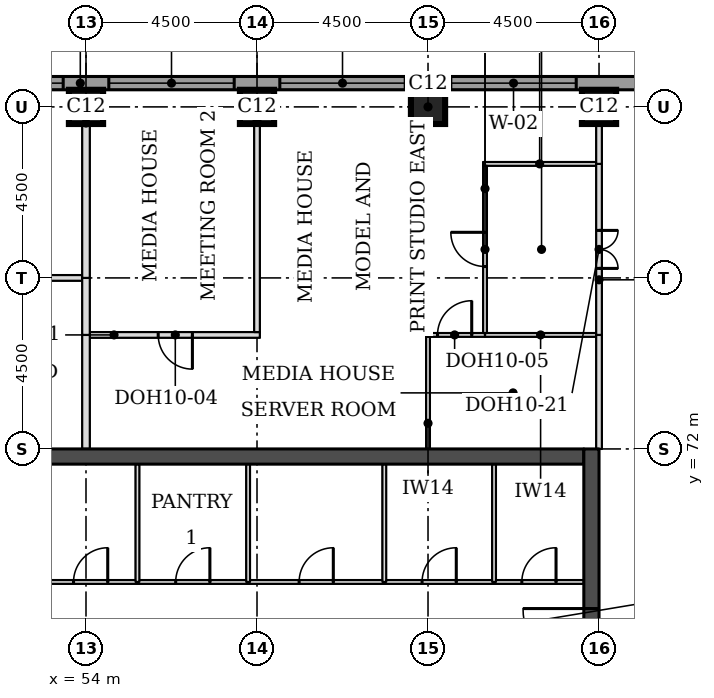
"""IFC4 building model, lengths in metres.
Left out: names, types, materials, properties, quantities, classifications, styles, units other than length and angle.
Written with IfcOpenShell. Run it as: python <this file> out.ifc"""

import sys

from ifc_helpers import new_model, si_unit, direction, frame, frame_2d, origin, origin_2d, place, context, subcontext, project, spatial, rectangle, extrude, element, fill, save


model = new_model("IFC4")
c1 = context("Model", 3, precision=1e-05, world=origin(), true_north=direction((0.0, 1.0)))
c2 = subcontext(c1, "Body", "Model", "MODEL_VIEW")
j1 = project(units=[si_unit("LENGTHUNIT", "METRE"), si_unit("PLANEANGLEUNIT", "RADIAN")], contexts=[c1])
p1 = place(None, origin())
s1 = spatial("IfcSite", under=j1, at=p1, CompositionType="ELEMENT")
p2 = place(p1, origin())
s2 = spatial("IfcBuilding", under=s1, at=p2, CompositionType="ELEMENT")
p3 = place(p2, frame((0.0, 0.0, 226.7)))
s3 = spatial("IfcBuildingStorey", under=s2, at=p3, CompositionType="ELEMENT", Elevation=226.7)
for number, where, z_axis, x_axis in (
    (1, (54.0, 81.0, 0.0), (0.0, 0.0, 1.0), (1.0, 0.0, 0.0)),
    (2, (58.5, 81.0, 0.0), (0.0, 0.0, 1.0), (1.0, 0.0, 0.0)),
    (3, (63.0, 81.0, 0.0), (0.0, 0.0, 1.0), (1.0, 0.0, 0.0)),
    (4, (67.5, 81.0, 0.0), (0.0, 0.0, 1.0), (1.0, 0.0, 0.0)),
):
    element("IfcColumn", number, at=place(p3, frame(where, z_axis=z_axis, x_axis=x_axis)), inside=s3, PredefinedType="COLUMN", context=c2, shape_type="SweptSolid", body=[
        extrude(rectangle(XDim=0.9, YDim=0.9, at=origin_2d()), origin(), (0.0, 0.0, 1.0), 3.7),
    ])
p4 = place(p3, frame((45.4, 71.8, 0.0), z_axis=(0.0, 0.0, 1.0), x_axis=(1.0, 0.0, 0.0)))
e5 = element("IfcWall", 5, at=p4, inside=s3, PredefinedType="SHEAR", context=c2, shape_type="SweptSolid", body=[
    extrude(rectangle(XDim=21.7, YDim=0.4, at=frame_2d((10.85, 0.0))), origin(), (0.0, 0.0, 1.0), 3.7),
])
p5 = place(p3, frame((67.3, 49.5, 0.0), z_axis=(0.0, 0.0, 1.0), x_axis=(0.0, 1.0, 0.0)))
e6 = element("IfcWall", 6, at=p5, inside=s3, PredefinedType="SHEAR", context=c2, shape_type="SweptSolid", body=[
    extrude(rectangle(XDim=22.5, YDim=0.4, at=frame_2d((11.25, 0.0))), origin(), (0.0, 0.0, 1.0), 3.7),
])
p6 = place(p5, frame((4.2, 0.0, 0.0)))
e7 = element("IfcOpeningElement", 7, at=p6, cuts=e6, PredefinedType="OPENING", context=c2, shape_type="SweptSolid", body=[
    extrude(rectangle(XDim=1.8, YDim=2.1, at=frame_2d((0.9, 1.05))), frame((0.0, 0.21, 0.0), z_axis=(0.0, -1.0, 0.0), x_axis=(1.0, 0.0, 0.0)), (0.0, 0.0, 1.0), 0.42),
])
p7 = place(p5, frame((6.9, 0.0, 0.0)))
e8 = element("IfcOpeningElement", 8, at=p7, cuts=e6, PredefinedType="OPENING", context=c2, shape_type="SweptSolid", body=[
    extrude(rectangle(XDim=1.1, YDim=2.1, at=frame_2d((0.55, 1.05))), frame((0.0, 0.21, 0.0), z_axis=(0.0, -1.0, 0.0), x_axis=(1.0, 0.0, 0.0)), (0.0, 0.0, 1.0), 0.42),
])
p8 = place(p5, frame((13.6, 0.0, 0.0)))
e9 = element("IfcOpeningElement", 9, at=p8, cuts=e6, PredefinedType="OPENING", context=c2, shape_type="SweptSolid", body=[
    extrude(rectangle(XDim=1.1, YDim=2.1, at=frame_2d((0.55, 1.05))), frame((0.0, 0.21, 0.0), z_axis=(0.0, -1.0, 0.0), x_axis=(1.0, 0.0, 0.0)), (0.0, 0.0, 1.0), 0.42),
])
p9 = place(p5, frame((16.5, 0.0, 0.0)))
e10 = element("IfcOpeningElement", 10, at=p9, cuts=e6, PredefinedType="OPENING", context=c2, shape_type="SweptSolid", body=[
    extrude(rectangle(XDim=1.8, YDim=2.1, at=frame_2d((0.9, 1.05))), frame((0.0, 0.21, 0.0), z_axis=(0.0, -1.0, 0.0), x_axis=(1.0, 0.0, 0.0)), (0.0, 0.0, 1.0), 0.42),
])
p10 = place(p3, frame((72.331, 81.625, 0.0), z_axis=(0.0, 0.0, 1.0), x_axis=(-1.0, 0.0, 0.0)))
e11 = element("IfcWall", 11, at=p10, inside=s3, PredefinedType="STANDARD", context=c2, shape_type="SweptSolid", body=[
    extrude(rectangle(XDim=32.163, YDim=0.35, at=frame_2d((16.081, 0.0))), origin(), (0.0, 0.0, 1.0), 3.525),
])
p11 = place(p10, frame((5.431, 0.0, 0.9)))
e12 = element("IfcOpeningElement", 12, at=p11, cuts=e11, PredefinedType="OPENING", context=c2, shape_type="SweptSolid", body=[
    extrude(rectangle(XDim=3.3, YDim=1.9, at=frame_2d((1.65, 0.95))), frame((0.0, 0.185, 0.0), z_axis=(0.0, -1.0, 0.0), x_axis=(1.0, 0.0, 0.0)), (0.0, 0.0, 1.0), 0.37),
])
p12 = place(p10, frame((9.931, 0.0, 0.9)))
e13 = element("IfcOpeningElement", 13, at=p12, cuts=e11, PredefinedType="OPENING", context=c2, shape_type="SweptSolid", body=[
    extrude(rectangle(XDim=3.3, YDim=1.9, at=frame_2d((1.65, 0.95))), frame((0.0, 0.185, 0.0), z_axis=(0.0, -1.0, 0.0), x_axis=(1.0, 0.0, 0.0)), (0.0, 0.0, 1.0), 0.37),
])
p13 = place(p10, frame((14.431, 0.0, 0.9)))
e14 = element("IfcOpeningElement", 14, at=p13, cuts=e11, PredefinedType="OPENING", context=c2, shape_type="SweptSolid", body=[
    extrude(rectangle(XDim=3.3, YDim=1.9, at=frame_2d((1.65, 0.95))), frame((0.0, 0.185, 0.0), z_axis=(0.0, -1.0, 0.0), x_axis=(1.0, 0.0, 0.0)), (0.0, 0.0, 1.0), 0.37),
])
p14 = place(p10, frame((18.931, 0.0, 0.9)))
e15 = element("IfcOpeningElement", 15, at=p14, cuts=e11, PredefinedType="OPENING", context=c2, shape_type="SweptSolid", body=[
    extrude(rectangle(XDim=3.3, YDim=1.9, at=frame_2d((1.65, 0.95))), frame((0.0, 0.185, 0.0), z_axis=(0.0, -1.0, 0.0), x_axis=(1.0, 0.0, 0.0)), (0.0, 0.0, 1.0), 0.37),
])
p15 = place(p10, frame((23.431, 0.0, 0.9)))
e16 = element("IfcOpeningElement", 16, at=p15, cuts=e11, PredefinedType="OPENING", context=c2, shape_type="SweptSolid", body=[
    extrude(rectangle(XDim=3.3, YDim=1.9, at=frame_2d((1.65, 0.95))), frame((0.0, 0.185, 0.0), z_axis=(0.0, -1.0, 0.0), x_axis=(1.0, 0.0, 0.0)), (0.0, 0.0, 1.0), 0.37),
])
p16 = place(p3, frame((54.1, 75.0, 0.0), z_axis=(0.0, 0.0, 1.0), x_axis=(1.0, 0.0, 0.0)))
e17 = element("IfcWall", 17, at=p16, inside=s3, PredefinedType="PARTITIONING", context=c2, shape_type="SweptSolid", body=[
    extrude(rectangle(XDim=4.475, YDim=0.15, at=frame_2d((2.237, 0.0))), origin(), (0.0, 0.0, 1.0), 3.55),
])
p17 = place(p16, frame((1.8, 0.0, 0.0)))
e18 = element("IfcOpeningElement", 18, at=p17, cuts=e17, PredefinedType="OPENING", context=c2, shape_type="SweptSolid", body=[
    extrude(rectangle(XDim=0.9, YDim=2.1, at=frame_2d((0.45, 1.05))), frame((0.0, 0.085, 0.0), z_axis=(0.0, -1.0, 0.0), x_axis=(1.0, 0.0, 0.0)), (0.0, 0.0, 1.0), 0.17),
])
p18 = place(p3, frame((62.95, 75.0, 0.0), z_axis=(0.0, 0.0, 1.0), x_axis=(1.0, 0.0, 0.0)))
e19 = element("IfcWall", 19, at=p18, inside=s3, PredefinedType="PARTITIONING", context=c2, shape_type="SweptSolid", body=[
    extrude(rectangle(XDim=1.55, YDim=0.1, at=frame_2d((0.775, 0.0))), origin(), (0.0, 0.0, 1.0), 3.55),
])
p19 = place(p18, frame((0.3, 0.0, 0.0)))
e20 = element("IfcOpeningElement", 20, at=p19, cuts=e19, PredefinedType="OPENING", context=c2, shape_type="SweptSolid", body=[
    extrude(rectangle(XDim=0.9, YDim=2.1, at=frame_2d((0.45, 1.05))), frame((0.0, 0.06, 0.0), z_axis=(0.0, -1.0, 0.0), x_axis=(1.0, 0.0, 0.0)), (0.0, 0.0, 1.0), 0.12),
])
p20 = place(p3, frame((64.5, 75.0, 0.0), z_axis=(0.0, 0.0, 1.0), x_axis=(1.0, 0.0, 0.0)))
e21 = element("IfcWall", 21, at=p20, inside=s3, PredefinedType="PARTITIONING", context=c2, shape_type="SweptSolid", body=[
    extrude(rectangle(XDim=2.925, YDim=0.1, at=frame_2d((1.462, 0.0))), origin(), (0.0, 0.0, 1.0), 3.55),
])
p21 = place(p3, frame((49.425, 76.5, 0.0), z_axis=(0.0, 0.0, 1.0), x_axis=(1.0, 0.0, 0.0)))
e22 = element("IfcWall", 22, at=p21, inside=s3, PredefinedType="PARTITIONING", context=c2, shape_type="SweptSolid", body=[
    extrude(rectangle(XDim=4.475, YDim=0.15, at=frame_2d((2.237, 0.0))), origin(), (0.0, 0.0, 1.0), 3.55),
])
p22 = place(p21, frame((1.8, 0.0, 0.0)))
e23 = element("IfcOpeningElement", 23, at=p22, cuts=e22, PredefinedType="OPENING", context=c2, shape_type="SweptSolid", body=[
    extrude(rectangle(XDim=0.9, YDim=2.1, at=frame_2d((0.45, 1.05))), frame((0.0, 0.085, 0.0), z_axis=(0.0, -1.0, 0.0), x_axis=(1.0, 0.0, 0.0)), (0.0, 0.0, 1.0), 0.17),
])
p23 = place(p3, frame((64.45, 79.5, 0.0), z_axis=(0.0, 0.0, 1.0), x_axis=(1.0, 0.0, 0.0)))
e24 = element("IfcWall", 24, at=p23, inside=s3, PredefinedType="PARTITIONING", context=c2, shape_type="SweptSolid", body=[
    extrude(rectangle(XDim=2.975, YDim=0.1, at=frame_2d((1.488, 0.0))), origin(), (0.0, 0.0, 1.0), 3.55),
])
p24 = place(p3, frame((54.0, 72.0, 0.0), z_axis=(0.0, 0.0, 1.0), x_axis=(0.0, 1.0, 0.0)))
e25 = element("IfcWall", 25, at=p24, inside=s3, PredefinedType="PARTITIONING", context=c2, shape_type="SweptSolid", body=[
    extrude(rectangle(XDim=3.0, YDim=0.2, at=frame_2d((1.5, 0.0))), origin(), (0.0, 0.0, 1.0), 3.55),
])
p25 = place(p3, frame((63.0, 72.0, 0.0), z_axis=(0.0, 0.0, 1.0), x_axis=(0.0, 1.0, 0.0)))
e26 = element("IfcWall", 26, at=p25, inside=s3, PredefinedType="PARTITIONING", context=c2, shape_type="SweptSolid", body=[
    extrude(rectangle(XDim=2.95, YDim=0.1, at=frame_2d((1.475, 0.0))), origin(), (0.0, 0.0, 1.0), 3.55),
])
p26 = place(p3, frame((67.5, 72.0, 0.0), z_axis=(0.0, 0.0, 1.0), x_axis=(0.0, 1.0, 0.0)))
e27 = element("IfcWall", 27, at=p26, inside=s3, PredefinedType="PARTITIONING", context=c2, shape_type="SweptSolid", body=[
    extrude(rectangle(XDim=3.0, YDim=0.15, at=frame_2d((1.5, 0.0))), origin(), (0.0, 0.0, 1.0), 3.022),
])
p27 = place(p3, frame((54.0, 75.0, 0.0), z_axis=(0.0, 0.0, 1.0), x_axis=(0.0, 1.0, 0.0)))
e28 = element("IfcWall", 28, at=p27, inside=s3, PredefinedType="PARTITIONING", context=c2, shape_type="SweptSolid", body=[
    extrude(rectangle(XDim=1.5, YDim=0.2, at=frame_2d((0.75, 0.0))), origin(), (0.0, 0.0, 1.0), 3.55),
])
p28 = place(p3, frame((67.5, 75.0, 0.0), z_axis=(0.0, 0.0, 1.0), x_axis=(0.0, 1.0, 0.0)))
e29 = element("IfcWall", 29, at=p28, inside=s3, PredefinedType="PARTITIONING", context=c2, shape_type="SweptSolid", body=[
    extrude(rectangle(XDim=4.5, YDim=0.15, at=frame_2d((2.25, 0.0))), origin(), (0.0, 0.0, 1.0), 3.022),
])
p29 = place(p28, frame((1.75, 0.0, 0.0)))
e30 = element("IfcOpeningElement", 30, at=p29, cuts=e29, PredefinedType="OPENING", context=c2, shape_type="SweptSolid", body=[
    extrude(rectangle(XDim=1.0, YDim=2.1, at=frame_2d((0.5, 1.05))), frame((0.0, 0.085, 0.0), z_axis=(0.0, -1.0, 0.0), x_axis=(1.0, 0.0, 0.0)), (0.0, 0.0, 1.0), 0.17),
])
p30 = place(p3, frame((64.5, 75.05, 0.0), z_axis=(0.0, 0.0, 1.0), x_axis=(0.0, 1.0, 0.0)))
e31 = element("IfcWall", 31, at=p30, inside=s3, PredefinedType="PARTITIONING", context=c2, shape_type="SweptSolid", body=[
    extrude(rectangle(XDim=4.4, YDim=0.1, at=frame_2d((2.2, 0.0))), origin(), (0.0, 0.0, 1.0), 3.55),
])
p31 = place(p30, frame((1.75, 0.0, 0.0)))
e32 = element("IfcOpeningElement", 32, at=p31, cuts=e31, PredefinedType="OPENING", context=c2, shape_type="SweptSolid", body=[
    extrude(rectangle(XDim=0.9, YDim=2.1, at=frame_2d((0.45, 1.05))), frame((0.0, 0.06, 0.0), z_axis=(0.0, -1.0, 0.0), x_axis=(1.0, 0.0, 0.0)), (0.0, 0.0, 1.0), 0.12),
])
p32 = place(p3, frame((58.5, 75.075, 0.0), z_axis=(0.0, 0.0, 1.0), x_axis=(0.0, 1.0, 0.0)))
e33 = element("IfcWall", 33, at=p32, inside=s3, PredefinedType="PARTITIONING", context=c2, shape_type="SweptSolid", body=[
    extrude(rectangle(XDim=6.375, YDim=0.15, at=frame_2d((3.188, 0.0))), origin(), (0.0, 0.0, 1.0), 3.55),
])
p33 = place(p3, frame((54.0, 76.5, 0.0), z_axis=(0.0, 0.0, 1.0), x_axis=(0.0, 1.0, 0.0)))
e34 = element("IfcWall", 34, at=p33, inside=s3, PredefinedType="PARTITIONING", context=c2, shape_type="SweptSolid", body=[
    extrude(rectangle(XDim=4.95, YDim=0.2, at=frame_2d((2.475, 0.0))), origin(), (0.0, 0.0, 1.0), 3.55),
])
p34 = place(p3, frame((67.5, 79.5, 0.0), z_axis=(0.0, 0.0, 1.0), x_axis=(0.0, 1.0, 0.0)))
e35 = element("IfcWall", 35, at=p34, inside=s3, PredefinedType="PARTITIONING", context=c2, shape_type="SweptSolid", body=[
    extrude(rectangle(XDim=1.95, YDim=0.15, at=frame_2d((0.975, 0.0))), origin(), (0.0, 0.0, 1.0), 3.022),
])
p35 = place(p3, frame((45.4, 68.5, 0.0), z_axis=(0.0, 0.0, 1.0), x_axis=(1.0, 0.0, 0.0)))
e36 = element("IfcWall", 36, at=p35, inside=s3, PredefinedType="PARTITIONING", context=c2, shape_type="SweptSolid", body=[
    extrude(rectangle(XDim=21.7, YDim=0.1, at=frame_2d((10.85, 0.0))), origin(), (0.0, 0.0, 1.0), 3.55),
])
p36 = place(p35, frame((20.069, 0.0, 0.0)))
e37 = element("IfcOpeningElement", 37, at=p36, cuts=e36, PredefinedType="OPENING", context=c2, shape_type="SweptSolid", body=[
    extrude(rectangle(XDim=0.9, YDim=2.1, at=frame_2d((0.45, 1.05))), frame((0.0, 0.06, 0.0), z_axis=(0.0, -1.0, 0.0), x_axis=(1.0, 0.0, 0.0)), (0.0, 0.0, 1.0), 0.12),
])
p37 = place(p35, frame((17.444, 0.0, 0.0)))
e38 = element("IfcOpeningElement", 38, at=p37, cuts=e36, PredefinedType="OPENING", context=c2, shape_type="SweptSolid", body=[
    extrude(rectangle(XDim=0.9, YDim=2.1, at=frame_2d((0.45, 1.05))), frame((0.0, 0.06, 0.0), z_axis=(0.0, -1.0, 0.0), x_axis=(1.0, 0.0, 0.0)), (0.0, 0.0, 1.0), 0.12),
])
p38 = place(p35, frame((2.175, 0.0, 0.0)))
e39 = element("IfcOpeningElement", 39, at=p38, cuts=e36, PredefinedType="OPENING", context=c2, shape_type="SweptSolid", body=[
    extrude(rectangle(XDim=0.9, YDim=2.1, at=frame_2d((0.45, 1.05))), frame((0.0, 0.06, 0.0), z_axis=(0.0, -1.0, 0.0), x_axis=(1.0, 0.0, 0.0)), (0.0, 0.0, 1.0), 0.12),
])
p39 = place(p35, frame((14.208, 0.0, 0.0)))
e40 = element("IfcOpeningElement", 40, at=p39, cuts=e36, PredefinedType="OPENING", context=c2, shape_type="SweptSolid", body=[
    extrude(rectangle(XDim=0.9, YDim=2.1, at=frame_2d((0.45, 1.05))), frame((0.0, 0.06, 0.0), z_axis=(0.0, -1.0, 0.0), x_axis=(1.0, 0.0, 0.0)), (0.0, 0.0, 1.0), 0.12),
])
p40 = place(p35, frame((10.96, 0.0, 0.0)))
e41 = element("IfcOpeningElement", 41, at=p40, cuts=e36, PredefinedType="OPENING", context=c2, shape_type="SweptSolid", body=[
    extrude(rectangle(XDim=0.9, YDim=2.1, at=frame_2d((0.45, 1.05))), frame((0.0, 0.06, 0.0), z_axis=(0.0, -1.0, 0.0), x_axis=(1.0, 0.0, 0.0)), (0.0, 0.0, 1.0), 0.12),
])
p41 = place(p35, frame((8.272, 0.0, 0.0)))
e42 = element("IfcOpeningElement", 42, at=p41, cuts=e36, PredefinedType="OPENING", context=c2, shape_type="SweptSolid", body=[
    extrude(rectangle(XDim=0.9, YDim=2.1, at=frame_2d((0.45, 1.05))), frame((0.0, 0.06, 0.0), z_axis=(0.0, -1.0, 0.0), x_axis=(1.0, 0.0, 0.0)), (0.0, 0.0, 1.0), 0.12),
])
p42 = place(p35, frame((5.92, 0.0, 0.0)))
e43 = element("IfcOpeningElement", 43, at=p42, cuts=e36, PredefinedType="OPENING", context=c2, shape_type="SweptSolid", body=[
    extrude(rectangle(XDim=0.9, YDim=2.1, at=frame_2d((0.45, 1.05))), frame((0.0, 0.06, 0.0), z_axis=(0.0, -1.0, 0.0), x_axis=(1.0, 0.0, 0.0)), (0.0, 0.0, 1.0), 0.12),
])
for number, where, z_axis, x_axis in (
    (44, (55.354, 68.5, 0.0), (0.0, 0.0, 1.0), (0.0, 1.0, 0.0)),
    (45, (58.266, 68.5, 0.0), (0.0, 0.0, 1.0), (0.0, 1.0, 0.0)),
    (46, (61.85, 68.5, 0.0), (0.0, 0.0, 1.0), (0.0, 1.0, 0.0)),
    (47, (64.738, 68.5, 0.0), (0.0, 0.0, 1.0), (0.0, 1.0, 0.0)),
):
    element("IfcWall", number, at=place(p3, frame(where, z_axis=z_axis, x_axis=x_axis)), inside=s3, PredefinedType="PARTITIONING", context=c2, shape_type="SweptSolid", body=[
        extrude(rectangle(XDim=3.1, YDim=0.1, at=frame_2d((1.55, 0.0))), origin(), (0.0, 0.0, 1.0), 3.55),
    ])
p43 = place(p11, origin())
e48 = element("IfcWindow", 48, at=p43, inside=s3, PartitioningType="SINGLE_PANEL", PredefinedType="WINDOW", context=c2, shape_type="SweptSolid", body=[
    extrude(rectangle(XDim=3.3, YDim=1.9, at=frame_2d((1.65, 0.95))), frame((0.0, 0.085, 0.0), z_axis=(0.0, -1.0, 0.0), x_axis=(1.0, 0.0, 0.0)), (0.0, 0.0, 1.0), 0.06),
])
fill(e12, e48)
p44 = place(p12, origin())
e49 = element("IfcWindow", 49, at=p44, inside=s3, PartitioningType="SINGLE_PANEL", PredefinedType="WINDOW", context=c2, shape_type="SweptSolid", body=[
    extrude(rectangle(XDim=3.3, YDim=1.9, at=frame_2d((1.65, 0.95))), frame((0.0, 0.085, 0.0), z_axis=(0.0, -1.0, 0.0), x_axis=(1.0, 0.0, 0.0)), (0.0, 0.0, 1.0), 0.06),
])
fill(e13, e49)
p45 = place(p13, origin())
e50 = element("IfcWindow", 50, at=p45, inside=s3, PartitioningType="SINGLE_PANEL", PredefinedType="WINDOW", context=c2, shape_type="SweptSolid", body=[
    extrude(rectangle(XDim=3.3, YDim=1.9, at=frame_2d((1.65, 0.95))), frame((0.0, 0.085, 0.0), z_axis=(0.0, -1.0, 0.0), x_axis=(1.0, 0.0, 0.0)), (0.0, 0.0, 1.0), 0.06),
])
fill(e14, e50)
p46 = place(p14, origin())
e51 = element("IfcWindow", 51, at=p46, inside=s3, PartitioningType="SINGLE_PANEL", PredefinedType="WINDOW", context=c2, shape_type="SweptSolid", body=[
    extrude(rectangle(XDim=3.3, YDim=1.9, at=frame_2d((1.65, 0.95))), frame((0.0, 0.085, 0.0), z_axis=(0.0, -1.0, 0.0), x_axis=(1.0, 0.0, 0.0)), (0.0, 0.0, 1.0), 0.06),
])
fill(e15, e51)
p47 = place(p29, frame((1.0, 0.0, 0.0), z_axis=(0.0, 0.0, 1.0), x_axis=(-1.0, 0.0, 0.0)))
e52 = element("IfcDoor", 52, at=p47, inside=s3, OperationType="DOUBLE_DOOR_SINGLE_SWING", PredefinedType="DOOR", context=c2, shape_type="SweptSolid", body=[
    extrude(rectangle(XDim=1.0, YDim=2.1, at=frame_2d((0.5, 1.05))), frame((0.0, 0.025, 0.0), z_axis=(0.0, -1.0, 0.0), x_axis=(1.0, 0.0, 0.0)), (0.0, 0.0, 1.0), 0.05),
])
fill(e30, e52)
p48 = place(p31, origin())
e53 = element("IfcDoor", 53, at=p48, inside=s3, OperationType="SINGLE_SWING_RIGHT", PredefinedType="DOOR", context=c2, shape_type="SweptSolid", body=[
    extrude(rectangle(XDim=0.9, YDim=2.1, at=frame_2d((0.45, 1.05))), frame((0.0, 0.025, 0.0), z_axis=(0.0, -1.0, 0.0), x_axis=(1.0, 0.0, 0.0)), (0.0, 0.0, 1.0), 0.05),
])
fill(e32, e53)
p49 = place(p17, frame((0.9, 0.0, 0.0), z_axis=(0.0, 0.0, 1.0), x_axis=(-1.0, 0.0, 0.0)))
e54 = element("IfcDoor", 54, at=p49, inside=s3, OperationType="SINGLE_SWING_LEFT", PredefinedType="DOOR", context=c2, shape_type="SweptSolid", body=[
    extrude(rectangle(XDim=0.9, YDim=2.1, at=frame_2d((0.45, 1.05))), frame((0.0, 0.025, 0.0), z_axis=(0.0, -1.0, 0.0), x_axis=(1.0, 0.0, 0.0)), (0.0, 0.0, 1.0), 0.05),
])
fill(e18, e54)
p50 = place(p19, origin())
e55 = element("IfcDoor", 55, at=p50, inside=s3, OperationType="SINGLE_SWING_RIGHT", PredefinedType="DOOR", context=c2, shape_type="SweptSolid", body=[
    extrude(rectangle(XDim=0.9, YDim=2.1, at=frame_2d((0.45, 1.05))), frame((0.0, 0.025, 0.0), z_axis=(0.0, -1.0, 0.0), x_axis=(1.0, 0.0, 0.0)), (0.0, 0.0, 1.0), 0.05),
])
fill(e20, e55)
p51 = place(p9, origin())
e56 = element("IfcDoor", 56, at=p51, inside=s3, OperationType="SINGLE_SWING_RIGHT", PredefinedType="DOOR", context=c2, shape_type="SweptSolid", body=[
    extrude(rectangle(XDim=1.8, YDim=2.1, at=frame_2d((0.9, 1.05))), frame((0.0, 0.025, 0.0), z_axis=(0.0, -1.0, 0.0), x_axis=(1.0, 0.0, 0.0)), (0.0, 0.0, 1.0), 0.05),
])
fill(e10, e56)
p52 = place(p36, origin())
e57 = element("IfcDoor", 57, at=p52, inside=s3, OperationType="SINGLE_SWING_RIGHT", PredefinedType="DOOR", context=c2, shape_type="SweptSolid", body=[
    extrude(rectangle(XDim=0.9, YDim=2.1, at=frame_2d((0.45, 1.05))), frame((0.0, 0.025, 0.0), z_axis=(0.0, -1.0, 0.0), x_axis=(1.0, 0.0, 0.0)), (0.0, 0.0, 1.0), 0.05),
])
fill(e37, e57)
p53 = place(p37, origin())
e58 = element("IfcDoor", 58, at=p53, inside=s3, OperationType="SINGLE_SWING_RIGHT", PredefinedType="DOOR", context=c2, shape_type="SweptSolid", body=[
    extrude(rectangle(XDim=0.9, YDim=2.1, at=frame_2d((0.45, 1.05))), frame((0.0, 0.025, 0.0), z_axis=(0.0, -1.0, 0.0), x_axis=(1.0, 0.0, 0.0)), (0.0, 0.0, 1.0), 0.05),
])
fill(e38, e58)
p54 = place(p39, origin())
e59 = element("IfcDoor", 59, at=p54, inside=s3, OperationType="SINGLE_SWING_RIGHT", PredefinedType="DOOR", context=c2, shape_type="SweptSolid", body=[
    extrude(rectangle(XDim=0.9, YDim=2.1, at=frame_2d((0.45, 1.05))), frame((0.0, 0.025, 0.0), z_axis=(0.0, -1.0, 0.0), x_axis=(1.0, 0.0, 0.0)), (0.0, 0.0, 1.0), 0.05),
])
fill(e40, e59)
p55 = place(p40, origin())
e60 = element("IfcDoor", 60, at=p55, inside=s3, OperationType="SINGLE_SWING_RIGHT", PredefinedType="DOOR", context=c2, shape_type="SweptSolid", body=[
    extrude(rectangle(XDim=0.9, YDim=2.1, at=frame_2d((0.45, 1.05))), frame((0.0, 0.025, 0.0), z_axis=(0.0, -1.0, 0.0), x_axis=(1.0, 0.0, 0.0)), (0.0, 0.0, 1.0), 0.05),
])
fill(e41, e60)
p56 = place(p41, origin())
e61 = element("IfcDoor", 61, at=p56, inside=s3, OperationType="SINGLE_SWING_RIGHT", PredefinedType="DOOR", context=c2, shape_type="SweptSolid", body=[
    extrude(rectangle(XDim=0.9, YDim=2.1, at=frame_2d((0.45, 1.05))), frame((0.0, 0.025, 0.0), z_axis=(0.0, -1.0, 0.0), x_axis=(1.0, 0.0, 0.0)), (0.0, 0.0, 1.0), 0.05),
])
fill(e42, e61)
save(model, sys.argv[1])
